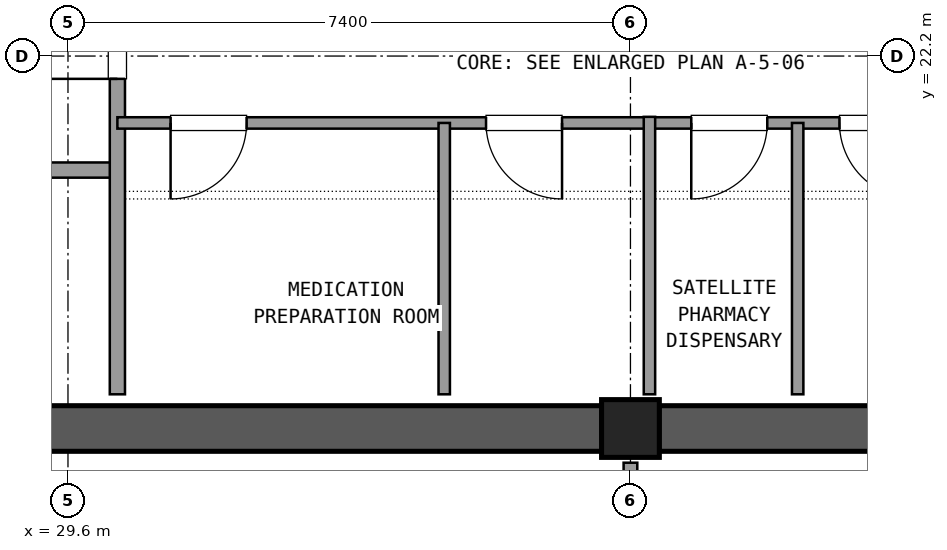
"""IFC4 building model, lengths in metres.
Left out: names, types, materials, properties, quantities, classifications, styles, units other than length and angle.
Written with IfcOpenShell. Run it as: python <this file> out.ifc"""

import sys

from ifc_helpers import new_model, si_unit, direction, frame, frame_2d, origin, origin_2d, place, context, subcontext, project, spatial, rectangle, extrude, element, fill, save


model = new_model("IFC4")
c1 = context("Model", 3, precision=1e-05, world=origin(), true_north=direction((0.0, 1.0)))
c2 = subcontext(c1, "Body", "Model", "MODEL_VIEW")
j1 = project(units=[si_unit("LENGTHUNIT", "METRE"), si_unit("PLANEANGLEUNIT", "RADIAN")], contexts=[c1])
p1 = place(None, origin())
s1 = spatial("IfcSite", under=j1, at=p1, CompositionType="ELEMENT")
p2 = place(p1, origin())
s2 = spatial("IfcBuilding", under=s1, at=p2, CompositionType="ELEMENT")
p3 = place(p2, frame((0.0, 0.0, 275.22)))
s3 = spatial("IfcBuildingStorey", under=s2, at=p3, CompositionType="ELEMENT", Elevation=275.22)
p4 = place(p3, frame((37.0, 17.3, 0.0), z_axis=(0.0, 0.0, 1.0), x_axis=(1.0, 0.0, 0.0)))
e1 = element("IfcColumn", 1, at=p4, inside=s3, PredefinedType="COLUMN", context=c2, shape_type="SweptSolid", body=[
    extrude(rectangle(XDim=0.76, YDim=0.76, at=origin_2d()), origin(), (0.0, 0.0, 1.0), 3.6),
])
for number, where, z_axis, x_axis in (
    (2, (26.175, 17.3, 0.0), (0.0, 0.0, 1.0), (1.0, 0.0, 0.0)),
    (3, (37.375, 17.3, 0.0), (0.0, 0.0, 1.0), (1.0, 0.0, 0.0)),
):
    element("IfcWall", number, at=place(p3, frame(where, z_axis=z_axis, x_axis=x_axis)), inside=s3, PredefinedType="SHEAR", context=c2, shape_type="SweptSolid", body=[
        extrude(rectangle(XDim=10.45, YDim=0.6, at=frame_2d((5.225, 0.0))), origin(), (0.0, 0.0, 1.0), 3.32),
    ])
p5 = place(p3, frame((26.25, 20.7, 0.0), z_axis=(0.0, 0.0, 1.0), x_axis=(1.0, 0.0, 0.0)))
e4 = element("IfcWall", 4, at=p5, inside=s3, PredefinedType="SOLIDWALL", context=c2, shape_type="SweptSolid", body=[
    extrude(rectangle(XDim=4.0, YDim=0.2, at=frame_2d((2.0, 0.0))), origin(), (0.0, 0.0, 1.0), 2.61),
])
p6 = place(p5, frame((0.65, 0.0, 0.0)))
e5 = element("IfcOpeningElement", 5, at=p6, cuts=e4, PredefinedType="OPENING", context=c2, shape_type="SweptSolid", body=[
    extrude(rectangle(XDim=1.2, YDim=2.15, at=frame_2d((0.6, 1.075))), frame((0.0, 0.11, 0.0), z_axis=(0.0, -1.0, 0.0), x_axis=(1.0, 0.0, 0.0)), (0.0, 0.0, 1.0), 0.22),
])
p7 = place(p3, frame((30.25, 17.75, 0.0), z_axis=(0.0, 0.0, 1.0), x_axis=(0.0, 1.0, 0.0)))
e6 = element("IfcWall", 6, at=p7, inside=s3, PredefinedType="SOLIDWALL", context=c2, shape_type="SweptSolid", body=[
    extrude(rectangle(XDim=6.9, YDim=0.2, at=frame_2d((3.45, 0.0))), origin(), (0.0, 0.0, 1.0), 2.61),
])
p8 = place(p7, frame((4.15, 0.0, 0.0)))
e7 = element("IfcOpeningElement", 7, at=p8, cuts=e6, PredefinedType="OPENING", context=c2, shape_type="SweptSolid", body=[
    extrude(rectangle(XDim=1.2, YDim=2.15, at=frame_2d((0.6, 1.075))), frame((0.0, 0.11, 0.0), z_axis=(0.0, -1.0, 0.0), x_axis=(1.0, 0.0, 0.0)), (0.0, 0.0, 1.0), 0.22),
])
p9 = place(p3, frame((30.25, 21.32, 0.0), z_axis=(0.0, 0.0, 1.0), x_axis=(1.0, 0.0, 0.0)))
e8 = element("IfcWall", 8, at=p9, inside=s3, PredefinedType="PARTITIONING", context=c2, shape_type="SweptSolid", body=[
    extrude(rectangle(XDim=7.0, YDim=0.15, at=frame_2d((3.5, 0.0))), origin(), (0.0, 0.0, 1.0), 2.61),
])
p10 = place(p9, frame((0.7, 0.0, 0.0)))
e9 = element("IfcOpeningElement", 9, at=p10, cuts=e8, PredefinedType="OPENING", context=c2, shape_type="SweptSolid", body=[
    extrude(rectangle(XDim=1.0, YDim=2.15, at=frame_2d((0.5, 1.075))), frame((0.0, 0.085, 0.0), z_axis=(0.0, -1.0, 0.0), x_axis=(1.0, 0.0, 0.0)), (0.0, 0.0, 1.0), 0.17),
])
p11 = place(p9, frame((4.85, 0.0, 0.0)))
e10 = element("IfcOpeningElement", 10, at=p11, cuts=e8, PredefinedType="OPENING", context=c2, shape_type="SweptSolid", body=[
    extrude(rectangle(XDim=1.0, YDim=2.15, at=frame_2d((0.5, 1.075))), frame((0.0, 0.085, 0.0), z_axis=(0.0, -1.0, 0.0), x_axis=(1.0, 0.0, 0.0)), (0.0, 0.0, 1.0), 0.17),
])
p12 = place(p3, frame((34.55, 17.75, 0.0), z_axis=(0.0, 0.0, 1.0), x_axis=(0.0, 1.0, 0.0)))
e11 = element("IfcWall", 11, at=p12, inside=s3, PredefinedType="PARTITIONING", context=c2, shape_type="SweptSolid", body=[
    extrude(rectangle(XDim=3.57, YDim=0.15, at=frame_2d((1.785, 0.0))), origin(), (0.0, 0.0, 1.0), 2.61),
])
p13 = place(p3, frame((37.25, 21.32, 0.0), z_axis=(0.0, 0.0, 1.0), x_axis=(1.0, 0.0, 0.0)))
e12 = element("IfcWall", 12, at=p13, inside=s3, PredefinedType="PARTITIONING", context=c2, shape_type="SweptSolid", body=[
    extrude(rectangle(XDim=6.1, YDim=0.15, at=frame_2d((3.05, 0.0))), origin(), (0.0, 0.0, 1.0), 2.61),
])
p14 = place(p13, frame((0.55, 0.0, 0.0)))
e13 = element("IfcOpeningElement", 13, at=p14, cuts=e12, PredefinedType="OPENING", context=c2, shape_type="SweptSolid", body=[
    extrude(rectangle(XDim=1.0, YDim=2.15, at=frame_2d((0.5, 1.075))), frame((0.0, 0.085, 0.0), z_axis=(0.0, -1.0, 0.0), x_axis=(1.0, 0.0, 0.0)), (0.0, 0.0, 1.0), 0.17),
])
p15 = place(p13, frame((2.5, 0.0, 0.0)))
e14 = element("IfcOpeningElement", 14, at=p15, cuts=e12, PredefinedType="OPENING", context=c2, shape_type="SweptSolid", body=[
    extrude(rectangle(XDim=1.0, YDim=2.15, at=frame_2d((0.5, 1.075))), frame((0.0, 0.085, 0.0), z_axis=(0.0, -1.0, 0.0), x_axis=(1.0, 0.0, 0.0)), (0.0, 0.0, 1.0), 0.17),
])
p16 = place(p3, frame((39.2, 17.75, 0.0), z_axis=(0.0, 0.0, 1.0), x_axis=(0.0, 1.0, 0.0)))
e15 = element("IfcWall", 15, at=p16, inside=s3, PredefinedType="PARTITIONING", context=c2, shape_type="SweptSolid", body=[
    extrude(rectangle(XDim=3.57, YDim=0.15, at=frame_2d((1.785, 0.0))), origin(), (0.0, 0.0, 1.0), 2.61),
])
p17 = place(p3, frame((37.25, 17.75, 0.0), z_axis=(0.0, 0.0, 1.0), x_axis=(0.0, 1.0, 0.0)))
e16 = element("IfcWall", 16, at=p17, inside=s3, PredefinedType="PARTITIONING", context=c2, shape_type="SweptSolid", body=[
    extrude(rectangle(XDim=3.65, YDim=0.15, at=frame_2d((1.825, 0.0))), origin(), (0.0, 0.0, 1.0), 2.61),
])
p18 = place(p3, frame((37.0, 14.15, 0.0), z_axis=(0.0, 0.0, 1.0), x_axis=(0.0, 1.0, 0.0)))
e17 = element("IfcWall", 17, at=p18, inside=s3, PredefinedType="PARTITIONING", context=c2, shape_type="SweptSolid", body=[
    extrude(rectangle(XDim=2.7, YDim=0.18, at=frame_2d((1.35, 0.0))), origin(), (0.0, 0.0, 1.0), 2.61),
])
p19 = place(p18, frame((0.35, 0.0, 0.0)))
e18 = element("IfcOpeningElement", 18, at=p19, cuts=e17, PredefinedType="OPENING", context=c2, shape_type="SweptSolid", body=[
    extrude(rectangle(XDim=2.0, YDim=2.2, at=frame_2d((1.0, 1.1))), frame((0.0, 0.1, 0.0), z_axis=(0.0, -1.0, 0.0), x_axis=(1.0, 0.0, 0.0)), (0.0, 0.0, 1.0), 0.2),
])
p20 = place(p8, origin())
e19 = element("IfcDoor", 19, at=p20, inside=s3, OperationType="SINGLE_SWING_LEFT", PredefinedType="DOOR", context=c2, shape_type="SweptSolid", body=[
    extrude(rectangle(XDim=1.2, YDim=2.15, at=frame_2d((0.6, 1.075))), frame((0.0, 0.025, 0.0), z_axis=(0.0, -1.0, 0.0), x_axis=(1.0, 0.0, 0.0)), (0.0, 0.0, 1.0), 0.05),
])
fill(e7, e19)
p21 = place(p10, frame((1.0, 0.0, 0.0), z_axis=(0.0, 0.0, 1.0), x_axis=(-1.0, 0.0, 0.0)))
e20 = element("IfcDoor", 20, at=p21, inside=s3, OperationType="SINGLE_SWING_LEFT", PredefinedType="DOOR", context=c2, shape_type="SweptSolid", body=[
    extrude(rectangle(XDim=1.0, YDim=2.15, at=frame_2d((0.5, 1.075))), frame((0.0, 0.025, 0.0), z_axis=(0.0, -1.0, 0.0), x_axis=(1.0, 0.0, 0.0)), (0.0, 0.0, 1.0), 0.05),
])
fill(e9, e20)
p22 = place(p11, frame((1.0, 0.0, 0.0), z_axis=(0.0, 0.0, 1.0), x_axis=(-1.0, 0.0, 0.0)))
e21 = element("IfcDoor", 21, at=p22, inside=s3, OperationType="SINGLE_SWING_RIGHT", PredefinedType="DOOR", context=c2, shape_type="SweptSolid", body=[
    extrude(rectangle(XDim=1.0, YDim=2.15, at=frame_2d((0.5, 1.075))), frame((0.0, 0.025, 0.0), z_axis=(0.0, -1.0, 0.0), x_axis=(1.0, 0.0, 0.0)), (0.0, 0.0, 1.0), 0.05),
])
fill(e10, e21)
p23 = place(p14, frame((1.0, 0.0, 0.0), z_axis=(0.0, 0.0, 1.0), x_axis=(-1.0, 0.0, 0.0)))
e22 = element("IfcDoor", 22, at=p23, inside=s3, OperationType="SINGLE_SWING_LEFT", PredefinedType="DOOR", context=c2, shape_type="SweptSolid", body=[
    extrude(rectangle(XDim=1.0, YDim=2.15, at=frame_2d((0.5, 1.075))), frame((0.0, 0.025, 0.0), z_axis=(0.0, -1.0, 0.0), x_axis=(1.0, 0.0, 0.0)), (0.0, 0.0, 1.0), 0.05),
])
fill(e13, e22)
p24 = place(p15, frame((1.0, 0.0, 0.0), z_axis=(0.0, 0.0, 1.0), x_axis=(-1.0, 0.0, 0.0)))
e23 = element("IfcDoor", 23, at=p24, inside=s3, OperationType="SINGLE_SWING_RIGHT", PredefinedType="DOOR", context=c2, shape_type="SweptSolid", body=[
    extrude(rectangle(XDim=1.0, YDim=2.15, at=frame_2d((0.5, 1.075))), frame((0.0, 0.025, 0.0), z_axis=(0.0, -1.0, 0.0), x_axis=(1.0, 0.0, 0.0)), (0.0, 0.0, 1.0), 0.05),
])
fill(e14, e23)
save(model, sys.argv[1])
